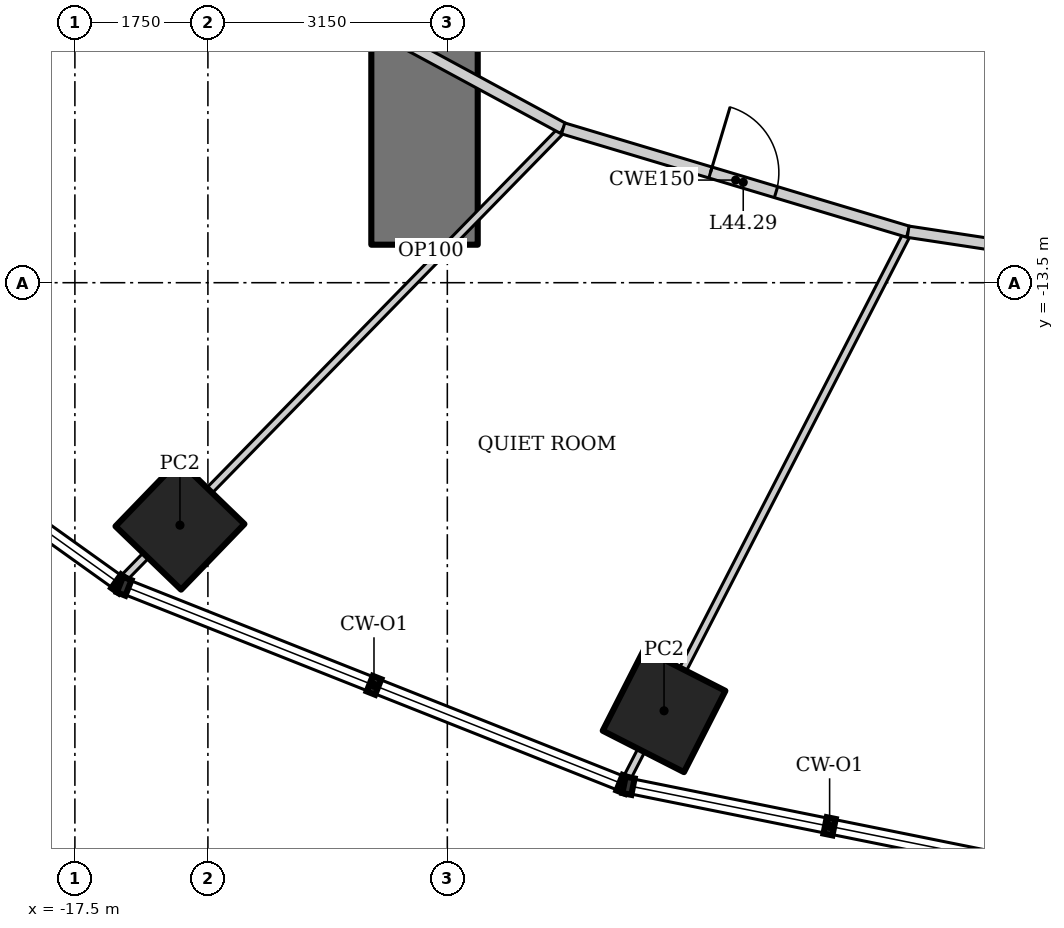
"""IFC4 building model, lengths in metres.
Left out: names, types, materials, properties, quantities, classifications, styles, units other than length and angle.
Written with IfcOpenShell. Run it as: python <this file> out.ifc"""

import sys

from ifc_helpers import new_model, si_unit, direction, frame, frame_2d, origin, origin_2d, place, context, subcontext, project, spatial, rectangle, hollow_rectangle, extrude, element, fill, save


model = new_model("IFC4")
c1 = context("Model", 3, precision=1e-05, world=origin(), true_north=direction((0.0, 1.0)))
c2 = subcontext(c1, "Body", "Model", "MODEL_VIEW")
j1 = project(units=[si_unit("LENGTHUNIT", "METRE"), si_unit("PLANEANGLEUNIT", "RADIAN")], contexts=[c1])
p1 = place(None, origin())
s1 = spatial("IfcSite", under=j1, at=p1, CompositionType="ELEMENT")
p2 = place(p1, origin())
s2 = spatial("IfcBuilding", under=s1, at=p2, CompositionType="ELEMENT")
p3 = place(p2, frame((0.0, 0.0, 188.8)))
s3 = spatial("IfcBuildingStorey", under=s2, at=p3, CompositionType="ELEMENT", Elevation=188.8)
for number, where, z_axis, x_axis in (
    (1, (-16.118, -16.69, 0.0), (0.0, 0.0, 1.0), (0.695, 0.719, 0.0)),
    (2, (-9.749, -19.133, 0.0), (0.0, 0.0, 1.0), (0.454, 0.891, 0.0)),
):
    element("IfcColumn", number, at=place(p3, frame(where, z_axis=z_axis, x_axis=x_axis)), inside=s3, PredefinedType="COLUMN", context=c2, shape_type="SweptSolid", body=[
        extrude(hollow_rectangle(XDim=1.2, YDim=1.2, WallThickness=0.1, at=origin_2d()), origin(), (0.0, 0.0, 1.0), 2.88),
    ])
p4 = place(p3, frame((-12.9, 13.0, 0.0), z_axis=(0.0, 0.0, 1.0), x_axis=(0.0, -1.0, 0.0)))
e3 = element("IfcWall", 3, at=p4, inside=s3, PredefinedType="SHEAR", context=c2, shape_type="SweptSolid", body=[
    extrude(rectangle(XDim=26.0, YDim=1.4, at=frame_2d((13.0, 0.0))), origin(), (0.0, 0.0, 1.0), 4.2),
])
p5 = place(p4, frame((12.1, 0.0, 0.0)))
e4 = element("IfcOpeningElement", 4, at=p5, cuts=e3, PredefinedType="OPENING", context=c2, shape_type="SweptSolid", body=[
    extrude(rectangle(XDim=1.8, YDim=2.1, at=frame_2d((0.9, 1.05))), frame((0.0, 0.71, 0.0), z_axis=(0.0, -1.0, 0.0), x_axis=(1.0, 0.0, 0.0)), (0.0, 0.0, 1.0), 1.42),
])
p6 = place(p3, frame((-16.882, -17.414, 0.0), z_axis=(0.0, 0.0, 1.0), x_axis=(0.698758056249, 0.715358077348, 0.0)))
e5 = element("IfcWall", 5, at=p6, inside=s3, PredefinedType="PARTITIONING", context=c2, shape_type="SweptSolid", body=[
    extrude(rectangle(XDim=8.31, YDim=0.1, at=frame_2d((4.155, 0.0))), origin(), (0.0, 0.0, 1.0), 3.058),
])
p7 = place(p3, frame((-10.253, -20.052, 0.0), z_axis=(0.0, 0.0, 1.0), x_axis=(0.457535449567, 0.889191381194, 0.0)))
e6 = element("IfcWall", 6, at=p7, inside=s3, PredefinedType="PARTITIONING", context=c2, shape_type="SweptSolid", body=[
    extrude(rectangle(XDim=8.123, YDim=0.1, at=frame_2d((4.061, 0.0))), origin(), (0.0, 0.0, 1.0), 3.228),
])
p8 = place(p3, frame((-15.696, -8.969, 0.0), z_axis=(0.0, 0.0, 1.0), x_axis=(0.879436285334, -0.476016617397, 0.0)))
e7 = element("IfcWall", 7, at=p8, inside=s3, PredefinedType="PARTITIONING", context=c2, shape_type="SweptSolid", body=[
    extrude(rectangle(XDim=5.253, YDim=0.15, at=frame_2d((2.626, 0.0))), origin(), (0.0, 0.0, 1.0), 4.0),
])
p9 = place(p3, frame((-11.076, -11.469, 0.0), z_axis=(0.0, 0.0, 1.0), x_axis=(0.957933992798, -0.286988615527, 0.0)))
e8 = element("IfcWall", 8, at=p9, inside=s3, PredefinedType="PARTITIONING", context=c2, shape_type="SweptSolid", body=[
    extrude(rectangle(XDim=4.738, YDim=0.15, at=frame_2d((2.369, 0.0))), origin(), (0.0, 0.0, 1.0), 4.0),
])
p10 = place(p9, frame((2.023, 0.0, 0.0)))
e9 = element("IfcOpeningElement", 9, at=p10, cuts=e8, PredefinedType="OPENING", context=c2, shape_type="SweptSolid", body=[
    extrude(rectangle(XDim=0.9, YDim=2.1, at=frame_2d((0.45, 1.05))), frame((0.0, 0.085, 0.0), z_axis=(0.0, -1.0, 0.0), x_axis=(1.0, 0.0, 0.0)), (0.0, 0.0, 1.0), 0.17),
])
p11 = place(p3, frame((-6.537, -12.829, 0.0), z_axis=(0.0, 0.0, 1.0), x_axis=(0.988668719464, -0.150113833987, 0.0)))
e10 = element("IfcWall", 10, at=p11, inside=s3, PredefinedType="PARTITIONING", context=c2, shape_type="SweptSolid", body=[
    extrude(rectangle(XDim=3.493, YDim=0.15, at=frame_2d((1.747, 0.0))), origin(), (0.0, 0.0, 1.0), 4.0),
])
p12 = place(p3, frame((-12.9, -13.0, 0.0), z_axis=(0.0, 0.0, 1.0), x_axis=(0.714845300066, -0.699282630253, 0.0)))
e11 = element("IfcWall", 11, at=p12, inside=s3, PredefinedType="PARTITIONING", context=c2, shape_type="SweptSolid", body=[
    extrude(rectangle(XDim=0.235, YDim=0.1, at=frame_2d((0.118, 0.0))), origin(), (0.0, 0.0, 1.0), 4.0),
])
p13 = place(p10, origin())
e12 = element("IfcDoor", 12, at=p13, inside=s3, OperationType="SINGLE_SWING_LEFT", PredefinedType="DOOR", context=c2, shape_type="SweptSolid", body=[
    extrude(rectangle(XDim=0.9, YDim=2.1, at=frame_2d((0.45, 1.05))), frame((0.0, 0.025, 0.0), z_axis=(0.0, -1.0, 0.0), x_axis=(1.0, 0.0, 0.0)), (0.0, 0.0, 1.0), 0.05),
])
fill(e9, e12)
save(model, sys.argv[1])
